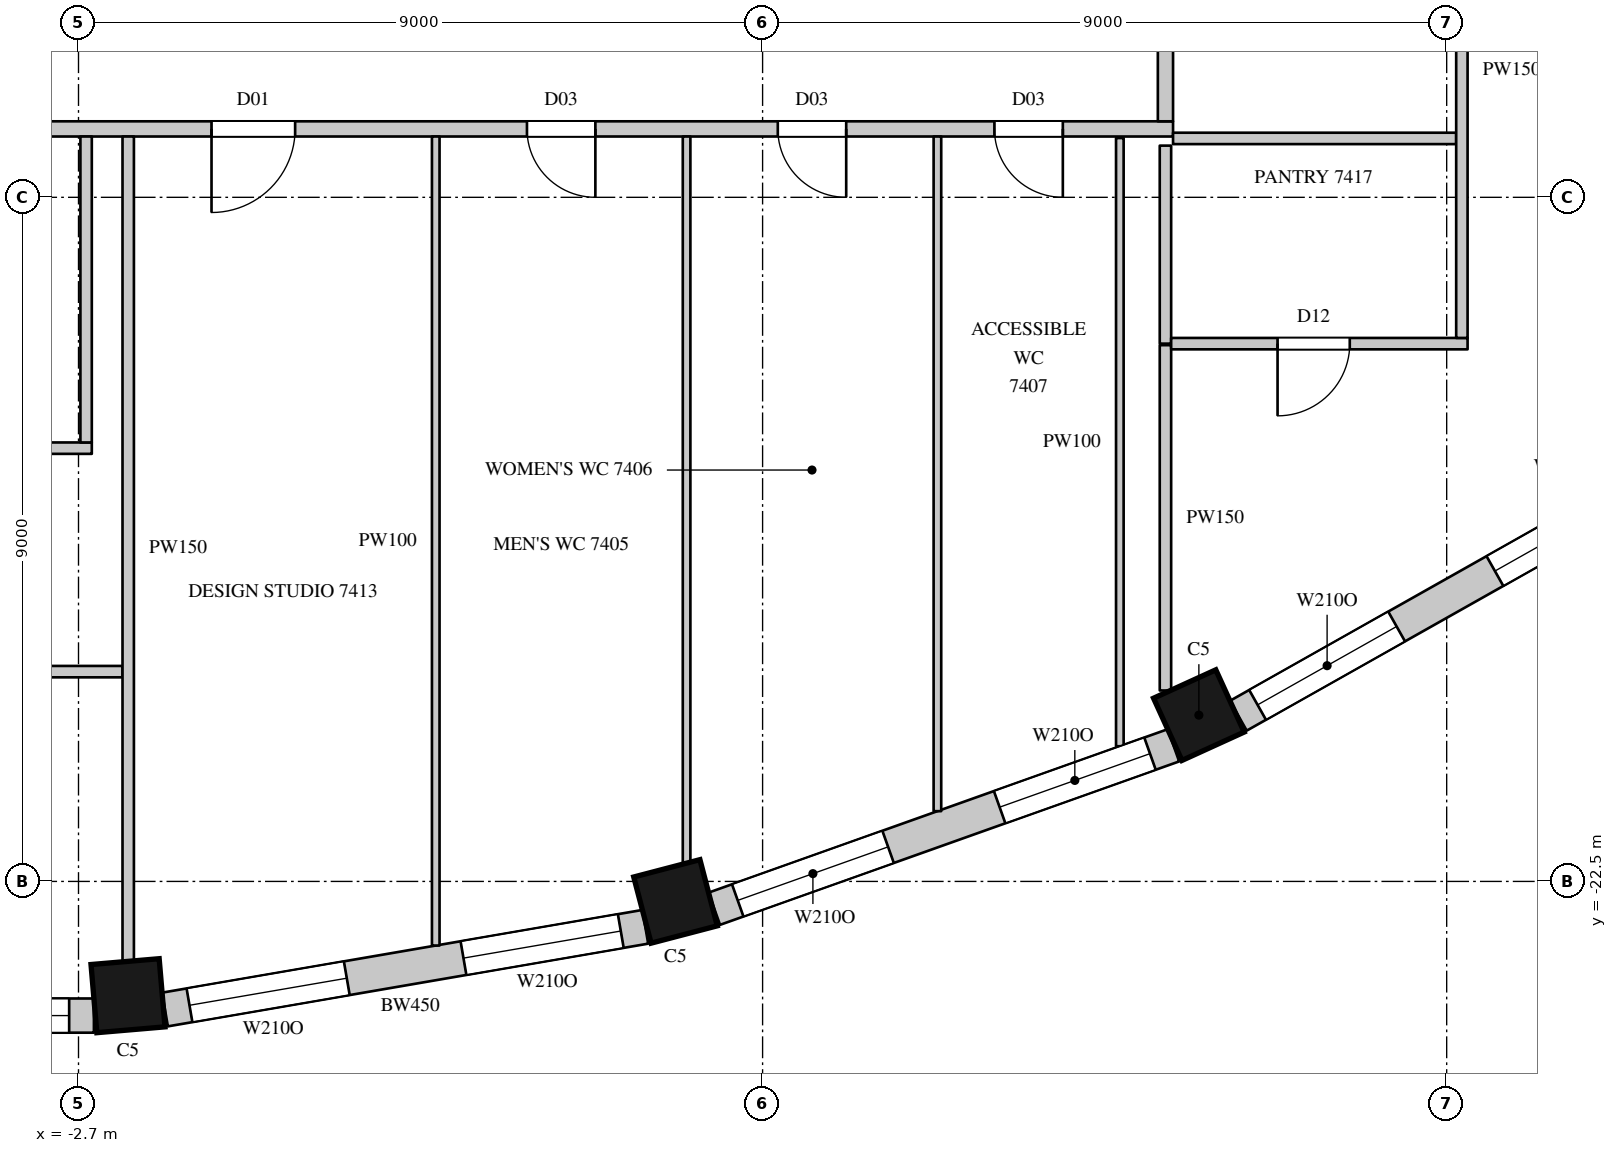
"""IFC4 building model, lengths in metres.
Left out: names, types, materials, properties, quantities, classifications, styles, units other than length and angle.
Written with IfcOpenShell. Run it as: python <this file> out.ifc"""

import sys

from ifc_helpers import new_model, si_unit, direction, frame, frame_2d, origin, origin_2d, place, context, subcontext, project, spatial, rectangle, extrude, element, fill, save


model = new_model("IFC4")
c1 = context("Model", 3, precision=1e-05, world=origin(), true_north=direction((0.0, 1.0)))
c2 = subcontext(c1, "Body", "Model", "MODEL_VIEW")
j1 = project(units=[si_unit("LENGTHUNIT", "METRE"), si_unit("PLANEANGLEUNIT", "RADIAN")], contexts=[c1])
p1 = place(None, origin())
s1 = spatial("IfcSite", under=j1, at=p1, CompositionType="ELEMENT")
p2 = place(p1, origin())
s2 = spatial("IfcBuilding", under=s1, at=p2, CompositionType="ELEMENT")
p3 = place(p2, frame((0.0, 0.0, 325.4)))
s3 = spatial("IfcBuildingStorey", under=s2, at=p3, CompositionType="ELEMENT", Elevation=325.4)
for number, where, z_axis, x_axis in (
    (1, (-2.049, -24.003, 0.0), (0.0, 0.0, 1.0), (0.996, 0.085, 0.0)),
    (2, (5.154, -22.763, 0.0), (0.0, 0.0, 1.0), (0.967, 0.253, 0.0)),
    (3, (12.04, -20.312, 0.0), (0.0, 0.0, 1.0), (0.91, 0.415, 0.0)),
):
    element("IfcColumn", number, at=place(p3, frame(where, z_axis=z_axis, x_axis=x_axis)), inside=s3, PredefinedType="COLUMN", context=c2, shape_type="SweptSolid", body=[
        extrude(rectangle(XDim=0.9, YDim=0.9, at=origin_2d()), origin(), (0.0, 0.0, 1.0), 4.1),
    ])
p4 = place(p3, frame((-8.903, -24.265, 0.0), z_axis=(0.0, 0.0, 1.0), x_axis=(1.0, 0.0, 0.0)))
e4 = element("IfcWall", 4, at=p4, inside=s3, PredefinedType="SOLIDWALL", context=c2, shape_type="SweptSolid", body=[
    extrude(rectangle(XDim=6.406, YDim=0.45, at=frame_2d((3.203, 0.0))), origin(), (0.0, 0.0, 1.0), 3.8),
])
p5 = place(p4, frame((0.325, 0.0, 1.05)))
e5 = element("IfcOpeningElement", 5, at=p5, cuts=e4, PredefinedType="OPENING", context=c2, shape_type="SweptSolid", body=[
    extrude(rectangle(XDim=2.1, YDim=2.4, at=frame_2d((1.05, 1.2))), frame((0.0, 0.235, 0.0), z_axis=(0.0, -1.0, 0.0), x_axis=(1.0, 0.0, 0.0)), (0.0, 0.0, 1.0), 0.47),
])
p6 = place(p4, frame((3.98, 0.0, 1.05)))
e6 = element("IfcOpeningElement", 6, at=p6, cuts=e4, PredefinedType="OPENING", context=c2, shape_type="SweptSolid", body=[
    extrude(rectangle(XDim=2.1, YDim=2.4, at=frame_2d((1.05, 1.2))), frame((0.0, 0.235, 0.0), z_axis=(0.0, -1.0, 0.0), x_axis=(1.0, 0.0, 0.0)), (0.0, 0.0, 1.0), 0.47),
])
p7 = place(p3, frame((-1.562, -24.185, 0.0), z_axis=(0.0, 0.0, 1.0), x_axis=(0.985502073964, 0.169663379113, 0.0)))
e7 = element("IfcWall", 7, at=p7, inside=s3, PredefinedType="SOLIDWALL", context=c2, shape_type="SweptSolid", body=[
    extrude(rectangle(XDim=6.412, YDim=0.45, at=frame_2d((3.206, 0.0))), origin(), (0.0, 0.0, 1.0), 3.8),
])
p8 = place(p7, frame((0.327, 0.0, 1.05)))
e8 = element("IfcOpeningElement", 8, at=p8, cuts=e7, PredefinedType="OPENING", context=c2, shape_type="SweptSolid", body=[
    extrude(rectangle(XDim=2.1, YDim=2.4, at=frame_2d((1.05, 1.2))), frame((0.0, 0.235, 0.0), z_axis=(0.0, -1.0, 0.0), x_axis=(1.0, 0.0, 0.0)), (0.0, 0.0, 1.0), 0.47),
])
p9 = place(p7, frame((3.985, 0.0, 1.05)))
e9 = element("IfcOpeningElement", 9, at=p9, cuts=e7, PredefinedType="OPENING", context=c2, shape_type="SweptSolid", body=[
    extrude(rectangle(XDim=2.1, YDim=2.4, at=frame_2d((1.05, 1.2))), frame((0.0, 0.235, 0.0), z_axis=(0.0, -1.0, 0.0), x_axis=(1.0, 0.0, 0.0)), (0.0, 0.0, 1.0), 0.47),
])
p10 = place(p3, frame((5.665, -22.859, 0.0), z_axis=(0.0, 0.0, 1.0), x_axis=(0.942108340262, 0.335308626803, 0.0)))
e10 = element("IfcWall", 10, at=p10, inside=s3, PredefinedType="SOLIDWALL", context=c2, shape_type="SweptSolid", body=[
    extrude(rectangle(XDim=6.412, YDim=0.45, at=frame_2d((3.206, 0.0))), origin(), (0.0, 0.0, 1.0), 3.8),
])
p11 = place(p10, frame((0.327, 0.0, 1.05)))
e11 = element("IfcOpeningElement", 11, at=p11, cuts=e10, PredefinedType="OPENING", context=c2, shape_type="SweptSolid", body=[
    extrude(rectangle(XDim=2.1, YDim=2.4, at=frame_2d((1.05, 1.2))), frame((0.0, 0.235, 0.0), z_axis=(0.0, -1.0, 0.0), x_axis=(1.0, 0.0, 0.0)), (0.0, 0.0, 1.0), 0.47),
])
p12 = place(p10, frame((3.985, 0.0, 1.05)))
e12 = element("IfcOpeningElement", 12, at=p12, cuts=e10, PredefinedType="OPENING", context=c2, shape_type="SweptSolid", body=[
    extrude(rectangle(XDim=2.1, YDim=2.4, at=frame_2d((1.05, 1.2))), frame((0.0, 0.235, 0.0), z_axis=(0.0, -1.0, 0.0), x_axis=(1.0, 0.0, 0.0)), (0.0, 0.0, 1.0), 0.47),
])
p13 = place(p3, frame((12.559, -20.32, 0.0), z_axis=(0.0, 0.0, 1.0), x_axis=(0.871065783524, 0.491166367714, 0.0)))
e13 = element("IfcWall", 13, at=p13, inside=s3, PredefinedType="SOLIDWALL", context=c2, shape_type="SweptSolid", body=[
    extrude(rectangle(XDim=6.196, YDim=0.45, at=frame_2d((3.098, 0.0))), origin(), (0.0, 0.0, 1.0), 3.8),
])
p14 = place(p13, frame((0.291, 0.0, 1.05)))
e14 = element("IfcOpeningElement", 14, at=p14, cuts=e13, PredefinedType="OPENING", context=c2, shape_type="SweptSolid", body=[
    extrude(rectangle(XDim=2.1, YDim=2.4, at=frame_2d((1.05, 1.2))), frame((0.0, 0.235, 0.0), z_axis=(0.0, -1.0, 0.0), x_axis=(1.0, 0.0, 0.0)), (0.0, 0.0, 1.0), 0.47),
])
p15 = place(p13, frame((3.875, 0.0, 1.05)))
e15 = element("IfcOpeningElement", 15, at=p15, cuts=e13, PredefinedType="OPENING", context=c2, shape_type="SweptSolid", body=[
    extrude(rectangle(XDim=2.1, YDim=2.4, at=frame_2d((1.05, 1.2))), frame((0.0, 0.235, 0.0), z_axis=(0.0, -1.0, 0.0), x_axis=(1.0, 0.0, 0.0)), (0.0, 0.0, 1.0), 0.47),
])
p16 = place(p3, frame((-10.9, -12.6, 0.0), z_axis=(0.0, 0.0, 1.0), x_axis=(1.0, 0.0, 0.0)))
e16 = element("IfcWall", 16, at=p16, inside=s3, PredefinedType="PARTITIONING", context=c2, shape_type="SweptSolid", body=[
    extrude(rectangle(XDim=22.6, YDim=0.2, at=frame_2d((11.3, 0.0))), origin(), (0.0, 0.0, 1.0), 3.8),
])
p17 = place(p16, frame((14.1, 0.0, 0.0)))
e17 = element("IfcOpeningElement", 17, at=p17, cuts=e16, PredefinedType="OPENING", context=c2, shape_type="SweptSolid", body=[
    extrude(rectangle(XDim=0.9, YDim=2.2, at=frame_2d((0.45, 1.1))), frame((0.0, 0.11, 0.0), z_axis=(0.0, -1.0, 0.0), x_axis=(1.0, 0.0, 0.0)), (0.0, 0.0, 1.0), 0.22),
])
p18 = place(p16, frame((17.4, 0.0, 0.0)))
e18 = element("IfcOpeningElement", 18, at=p18, cuts=e16, PredefinedType="OPENING", context=c2, shape_type="SweptSolid", body=[
    extrude(rectangle(XDim=0.9, YDim=2.2, at=frame_2d((0.45, 1.1))), frame((0.0, 0.11, 0.0), z_axis=(0.0, -1.0, 0.0), x_axis=(1.0, 0.0, 0.0)), (0.0, 0.0, 1.0), 0.22),
])
p19 = place(p16, frame((20.25, 0.0, 0.0)))
e19 = element("IfcOpeningElement", 19, at=p19, cuts=e16, PredefinedType="OPENING", context=c2, shape_type="SweptSolid", body=[
    extrude(rectangle(XDim=0.9, YDim=2.2, at=frame_2d((0.45, 1.1))), frame((0.0, 0.11, 0.0), z_axis=(0.0, -1.0, 0.0), x_axis=(1.0, 0.0, 0.0)), (0.0, 0.0, 1.0), 0.22),
])
p20 = place(p16, frame((1.95, 0.0, 0.0)))
e20 = element("IfcOpeningElement", 20, at=p20, cuts=e16, PredefinedType="OPENING", context=c2, shape_type="SweptSolid", body=[
    extrude(rectangle(XDim=1.1, YDim=2.4, at=frame_2d((0.55, 1.2))), frame((0.0, 0.11, 0.0), z_axis=(0.0, -1.0, 0.0), x_axis=(1.0, 0.0, 0.0)), (0.0, 0.0, 1.0), 0.22),
])
p21 = place(p16, frame((9.95, 0.0, 0.0)))
e21 = element("IfcOpeningElement", 21, at=p21, cuts=e16, PredefinedType="OPENING", context=c2, shape_type="SweptSolid", body=[
    extrude(rectangle(XDim=1.1, YDim=2.4, at=frame_2d((0.55, 1.2))), frame((0.0, 0.11, 0.0), z_axis=(0.0, -1.0, 0.0), x_axis=(1.0, 0.0, 0.0)), (0.0, 0.0, 1.0), 0.22),
])
p22 = place(p3, frame((11.6, -12.5, 0.0), z_axis=(0.0, 0.0, 1.0), x_axis=(0.0, 1.0, 0.0)))
e22 = element("IfcWall", 22, at=p22, inside=s3, PredefinedType="PARTITIONING", context=c2, shape_type="SweptSolid", body=[
    extrude(rectangle(XDim=25.0, YDim=0.2, at=frame_2d((12.5, 0.0))), origin(), (0.0, 0.0, 1.0), 3.8),
])
p23 = place(p22, frame((9.4, 0.0, 0.0)))
e23 = element("IfcOpeningElement", 23, at=p23, cuts=e22, PredefinedType="OPENING", context=c2, shape_type="SweptSolid", body=[
    extrude(rectangle(XDim=1.5, YDim=2.4, at=frame_2d((0.75, 1.2))), frame((0.0, 0.11, 0.0), z_axis=(0.0, -1.0, 0.0), x_axis=(1.0, 0.0, 0.0)), (0.0, 0.0, 1.0), 0.22),
])
p24 = place(p22, frame((5.5, 0.0, 0.0)))
e24 = element("IfcOpeningElement", 24, at=p24, cuts=e22, PredefinedType="OPENING", context=c2, shape_type="SweptSolid", body=[
    extrude(rectangle(XDim=1.1, YDim=2.4, at=frame_2d((0.55, 1.2))), frame((0.0, 0.11, 0.0), z_axis=(0.0, -1.0, 0.0), x_axis=(1.0, 0.0, 0.0)), (0.0, 0.0, 1.0), 0.22),
])
p25 = place(p3, frame((-9.429, -19.74, 0.0), z_axis=(0.0, 0.0, 1.0), x_axis=(1.0, 0.0, 0.0)))
e25 = element("IfcWall", 25, at=p25, inside=s3, PredefinedType="PARTITIONING", context=c2, shape_type="SweptSolid", body=[
    extrude(rectangle(XDim=7.308, YDim=0.15, at=frame_2d((3.654, 0.0))), origin(), (0.0, 0.0, 1.0), 3.8),
])
p26 = place(p25, frame((4.8, 0.0, 0.0)))
e26 = element("IfcOpeningElement", 26, at=p26, cuts=e25, PredefinedType="OPENING", context=c2, shape_type="SweptSolid", body=[
    extrude(rectangle(XDim=1.5, YDim=2.2, at=frame_2d((0.75, 1.1))), frame((0.0, 0.085, 0.0), z_axis=(0.0, -1.0, 0.0), x_axis=(1.0, 0.0, 0.0)), (0.0, 0.0, 1.0), 0.17),
])
p27 = place(p3, frame((-5.675, -16.8, 0.0), z_axis=(0.0, 0.0, 1.0), x_axis=(1.0, 0.0, 0.0)))
e27 = element("IfcWall", 27, at=p27, inside=s3, PredefinedType="PARTITIONING", context=c2, shape_type="SweptSolid", body=[
    extrude(rectangle(XDim=3.15, YDim=0.15, at=frame_2d((1.575, 0.0))), origin(), (0.0, 0.0, 1.0), 3.8),
])
p28 = place(p3, frame((-2.6, -16.725, 0.0), z_axis=(0.0, 0.0, 1.0), x_axis=(0.0, 1.0, 0.0)))
e28 = element("IfcWall", 28, at=p28, inside=s3, PredefinedType="PARTITIONING", context=c2, shape_type="SweptSolid", body=[
    extrude(rectangle(XDim=4.025, YDim=0.15, at=frame_2d((2.013, 0.0))), origin(), (0.0, 0.0, 1.0), 3.8),
])
p29 = place(p3, frame((-2.046, -23.542, 0.0), z_axis=(0.0, 0.0, 1.0), x_axis=(0.0, 1.0, 0.0)))
e29 = element("IfcWall", 29, at=p29, inside=s3, PredefinedType="PARTITIONING", context=c2, shape_type="SweptSolid", body=[
    extrude(rectangle(XDim=10.842, YDim=0.15, at=frame_2d((5.421, 0.0))), origin(), (0.0, 0.0, 1.0), 3.8),
])
p30 = place(p3, frame((11.6, -19.988, 0.0), z_axis=(0.0, 0.0, 1.0), x_axis=(0.0, 1.0, 0.0)))
e30 = element("IfcWall", 30, at=p30, inside=s3, PredefinedType="PARTITIONING", context=c2, shape_type="SweptSolid", body=[
    extrude(rectangle(XDim=4.543, YDim=0.15, at=frame_2d((2.271, 0.0))), origin(), (0.0, 0.0, 1.0), 3.8),
])
p31 = place(p3, frame((11.6, -15.425, 0.0), z_axis=(0.0, 0.0, 1.0), x_axis=(0.0, 1.0, 0.0)))
e31 = element("IfcWall", 31, at=p31, inside=s3, PredefinedType="PARTITIONING", context=c2, shape_type="SweptSolid", body=[
    extrude(rectangle(XDim=2.605, YDim=0.15, at=frame_2d((1.302, 0.0))), origin(), (0.0, 0.0, 1.0), 3.8),
])
p32 = place(p3, frame((11.675, -15.425, 0.0), z_axis=(0.0, 0.0, 1.0), x_axis=(1.0, 0.0, 0.0)))
e32 = element("IfcWall", 32, at=p32, inside=s3, PredefinedType="PARTITIONING", context=c2, shape_type="SweptSolid", body=[
    extrude(rectangle(XDim=3.9, YDim=0.15, at=frame_2d((1.95, 0.0))), origin(), (0.0, 0.0, 1.0), 3.8),
])
p33 = place(p32, frame((1.4, 0.0, 0.0)))
e33 = element("IfcOpeningElement", 33, at=p33, cuts=e32, PredefinedType="OPENING", context=c2, shape_type="SweptSolid", body=[
    extrude(rectangle(XDim=0.95, YDim=2.2, at=frame_2d((0.475, 1.1))), frame((0.0, 0.085, 0.0), z_axis=(0.0, -1.0, 0.0), x_axis=(1.0, 0.0, 0.0)), (0.0, 0.0, 1.0), 0.17),
])
p34 = place(p3, frame((11.7, -12.725, 0.0), z_axis=(0.0, 0.0, 1.0), x_axis=(1.0, 0.0, 0.0)))
e34 = element("IfcWall", 34, at=p34, inside=s3, PredefinedType="PARTITIONING", context=c2, shape_type="SweptSolid", body=[
    extrude(rectangle(XDim=3.725, YDim=0.15, at=frame_2d((1.863, 0.0))), origin(), (0.0, 0.0, 1.0), 3.8),
])
p35 = place(p3, frame((15.5, -15.35, 0.0), z_axis=(0.0, 0.0, 1.0), x_axis=(0.0, 1.0, 0.0)))
e35 = element("IfcWall", 35, at=p35, inside=s3, PredefinedType="PARTITIONING", context=c2, shape_type="SweptSolid", body=[
    extrude(rectangle(XDim=7.05, YDim=0.15, at=frame_2d((3.525, 0.0))), origin(), (0.0, 0.0, 1.0), 3.8),
])
p36 = place(p3, frame((2.0, -23.344, 0.0), z_axis=(0.0, 0.0, 1.0), x_axis=(0.0, 1.0, 0.0)))
e36 = element("IfcWall", 36, at=p36, inside=s3, PredefinedType="PARTITIONING", context=c2, shape_type="SweptSolid", body=[
    extrude(rectangle(XDim=10.644, YDim=0.1, at=frame_2d((5.322, 0.0))), origin(), (0.0, 0.0, 1.0), 3.8),
])
p37 = place(p3, frame((5.3, -22.25, 0.0), z_axis=(0.0, 0.0, 1.0), x_axis=(0.0, 1.0, 0.0)))
e37 = element("IfcWall", 37, at=p37, inside=s3, PredefinedType="PARTITIONING", context=c2, shape_type="SweptSolid", body=[
    extrude(rectangle(XDim=9.55, YDim=0.1, at=frame_2d((4.775, 0.0))), origin(), (0.0, 0.0, 1.0), 3.8),
])
p38 = place(p3, frame((8.6, -21.576, 0.0), z_axis=(0.0, 0.0, 1.0), x_axis=(0.0, 1.0, 0.0)))
e38 = element("IfcWall", 38, at=p38, inside=s3, PredefinedType="PARTITIONING", context=c2, shape_type="SweptSolid", body=[
    extrude(rectangle(XDim=8.876, YDim=0.1, at=frame_2d((4.438, 0.0))), origin(), (0.0, 0.0, 1.0), 3.8),
])
p39 = place(p3, frame((11.0, -20.721, 0.0), z_axis=(0.0, 0.0, 1.0), x_axis=(0.0, 1.0, 0.0)))
e39 = element("IfcWall", 39, at=p39, inside=s3, PredefinedType="PARTITIONING", context=c2, shape_type="SweptSolid", body=[
    extrude(rectangle(XDim=8.001, YDim=0.1, at=frame_2d((4.001, 0.0))), origin(), (0.0, 0.0, 1.0), 3.8),
])
p40 = place(p6, origin())
e40 = element("IfcWindow", 40, at=p40, inside=s3, PartitioningType="SINGLE_PANEL", PredefinedType="WINDOW", context=c2, shape_type="SweptSolid", body=[
    extrude(rectangle(XDim=2.1, YDim=2.4, at=frame_2d((1.05, 1.2))), frame((0.0, 0.135, 0.0), z_axis=(0.0, -1.0, 0.0), x_axis=(1.0, 0.0, 0.0)), (0.0, 0.0, 1.0), 0.06),
])
fill(e6, e40)
p41 = place(p8, origin())
e41 = element("IfcWindow", 41, at=p41, inside=s3, PartitioningType="SINGLE_PANEL", PredefinedType="WINDOW", context=c2, shape_type="SweptSolid", body=[
    extrude(rectangle(XDim=2.1, YDim=2.4, at=frame_2d((1.05, 1.2))), frame((0.0, 0.135, 0.0), z_axis=(0.0, -1.0, 0.0), x_axis=(1.0, 0.0, 0.0)), (0.0, 0.0, 1.0), 0.06),
])
fill(e8, e41)
p42 = place(p9, origin())
e42 = element("IfcWindow", 42, at=p42, inside=s3, PartitioningType="SINGLE_PANEL", PredefinedType="WINDOW", context=c2, shape_type="SweptSolid", body=[
    extrude(rectangle(XDim=2.1, YDim=2.4, at=frame_2d((1.05, 1.2))), frame((0.0, 0.135, 0.0), z_axis=(0.0, -1.0, 0.0), x_axis=(1.0, 0.0, 0.0)), (0.0, 0.0, 1.0), 0.06),
])
fill(e9, e42)
p43 = place(p11, origin())
e43 = element("IfcWindow", 43, at=p43, inside=s3, PartitioningType="SINGLE_PANEL", PredefinedType="WINDOW", context=c2, shape_type="SweptSolid", body=[
    extrude(rectangle(XDim=2.1, YDim=2.4, at=frame_2d((1.05, 1.2))), frame((0.0, 0.135, 0.0), z_axis=(0.0, -1.0, 0.0), x_axis=(1.0, 0.0, 0.0)), (0.0, 0.0, 1.0), 0.06),
])
fill(e11, e43)
p44 = place(p12, origin())
e44 = element("IfcWindow", 44, at=p44, inside=s3, PartitioningType="SINGLE_PANEL", PredefinedType="WINDOW", context=c2, shape_type="SweptSolid", body=[
    extrude(rectangle(XDim=2.1, YDim=2.4, at=frame_2d((1.05, 1.2))), frame((0.0, 0.135, 0.0), z_axis=(0.0, -1.0, 0.0), x_axis=(1.0, 0.0, 0.0)), (0.0, 0.0, 1.0), 0.06),
])
fill(e12, e44)
p45 = place(p14, origin())
e45 = element("IfcWindow", 45, at=p45, inside=s3, PartitioningType="SINGLE_PANEL", PredefinedType="WINDOW", context=c2, shape_type="SweptSolid", body=[
    extrude(rectangle(XDim=2.1, YDim=2.4, at=frame_2d((1.05, 1.2))), frame((0.0, 0.135, 0.0), z_axis=(0.0, -1.0, 0.0), x_axis=(1.0, 0.0, 0.0)), (0.0, 0.0, 1.0), 0.06),
])
fill(e14, e45)
p46 = place(p15, origin())
e46 = element("IfcWindow", 46, at=p46, inside=s3, PartitioningType="SINGLE_PANEL", PredefinedType="WINDOW", context=c2, shape_type="SweptSolid", body=[
    extrude(rectangle(XDim=2.1, YDim=2.4, at=frame_2d((1.05, 1.2))), frame((0.0, 0.135, 0.0), z_axis=(0.0, -1.0, 0.0), x_axis=(1.0, 0.0, 0.0)), (0.0, 0.0, 1.0), 0.06),
])
fill(e15, e46)
p47 = place(p17, origin())
e47 = element("IfcDoor", 47, at=p47, inside=s3, OperationType="SINGLE_SWING_LEFT", PredefinedType="DOOR", context=c2, shape_type="SweptSolid", body=[
    extrude(rectangle(XDim=0.9, YDim=2.2, at=frame_2d((0.45, 1.1))), frame((0.0, 0.025, 0.0), z_axis=(0.0, -1.0, 0.0), x_axis=(1.0, 0.0, 0.0)), (0.0, 0.0, 1.0), 0.05),
])
fill(e17, e47)
p48 = place(p18, origin())
e48 = element("IfcDoor", 48, at=p48, inside=s3, OperationType="SINGLE_SWING_LEFT", PredefinedType="DOOR", context=c2, shape_type="SweptSolid", body=[
    extrude(rectangle(XDim=0.9, YDim=2.2, at=frame_2d((0.45, 1.1))), frame((0.0, 0.025, 0.0), z_axis=(0.0, -1.0, 0.0), x_axis=(1.0, 0.0, 0.0)), (0.0, 0.0, 1.0), 0.05),
])
fill(e18, e48)
p49 = place(p19, origin())
e49 = element("IfcDoor", 49, at=p49, inside=s3, OperationType="SINGLE_SWING_LEFT", PredefinedType="DOOR", context=c2, shape_type="SweptSolid", body=[
    extrude(rectangle(XDim=0.9, YDim=2.2, at=frame_2d((0.45, 1.1))), frame((0.0, 0.025, 0.0), z_axis=(0.0, -1.0, 0.0), x_axis=(1.0, 0.0, 0.0)), (0.0, 0.0, 1.0), 0.05),
])
fill(e19, e49)
p50 = place(p21, origin())
e50 = element("IfcDoor", 50, at=p50, inside=s3, OperationType="SINGLE_SWING_RIGHT", PredefinedType="DOOR", context=c2, shape_type="SweptSolid", body=[
    extrude(rectangle(XDim=1.1, YDim=2.4, at=frame_2d((0.55, 1.2))), frame((0.0, 0.025, 0.0), z_axis=(0.0, -1.0, 0.0), x_axis=(1.0, 0.0, 0.0)), (0.0, 0.0, 1.0), 0.05),
])
fill(e21, e50)
p51 = place(p33, origin())
e51 = element("IfcDoor", 51, at=p51, inside=s3, OperationType="SINGLE_SWING_RIGHT", PredefinedType="DOOR", context=c2, shape_type="SweptSolid", body=[
    extrude(rectangle(XDim=0.95, YDim=2.2, at=frame_2d((0.475, 1.1))), frame((0.0, 0.025, 0.0), z_axis=(0.0, -1.0, 0.0), x_axis=(1.0, 0.0, 0.0)), (0.0, 0.0, 1.0), 0.05),
])
fill(e33, e51)
save(model, sys.argv[1])
